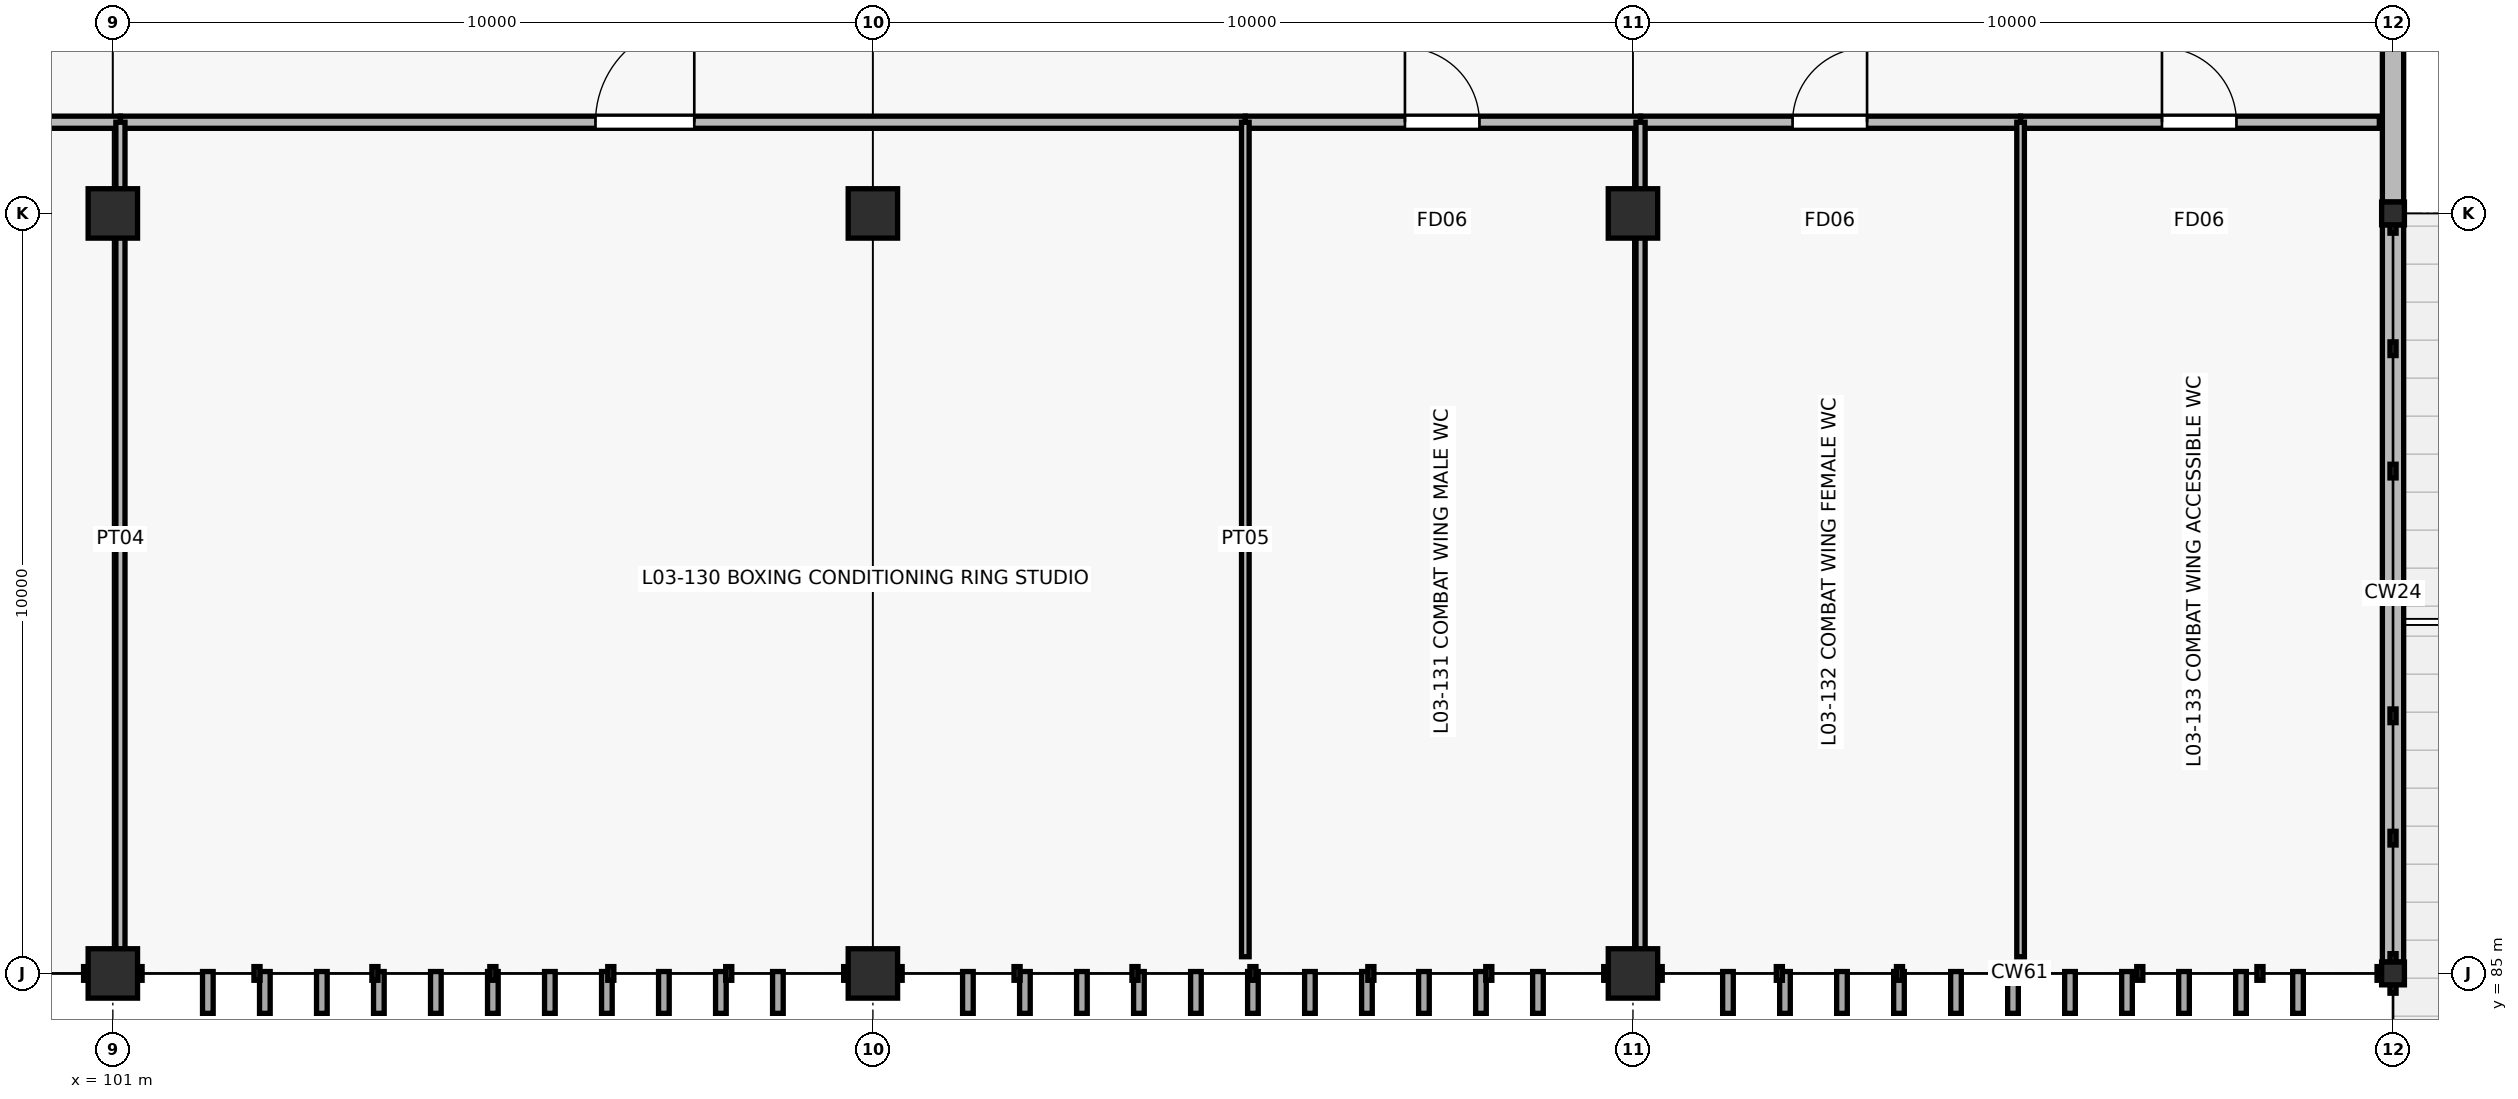
"""IFC4 building model, lengths in metres.
Left out: names, types, materials, properties, quantities, classifications, styles, units other than length and angle.
Written with IfcOpenShell. Run it as: python <this file> out.ifc"""

import sys

from ifc_helpers import new_model, si_unit, direction, frame, frame_2d, origin, origin_2d, place, context, subcontext, project, spatial, rectangle, i_section, extrude, element, fill, save


model = new_model("IFC4")
c1 = context("Model", 3, precision=1e-05, world=origin(), true_north=direction((0.0, 1.0)))
c2 = subcontext(c1, "Body", "Model", "MODEL_VIEW")
j1 = project(units=[si_unit("LENGTHUNIT", "METRE"), si_unit("PLANEANGLEUNIT", "RADIAN")], contexts=[c1])
p1 = place(None, origin())
s1 = spatial("IfcSite", under=j1, at=p1, CompositionType="ELEMENT")
p2 = place(p1, origin())
s2 = spatial("IfcBuilding", under=s1, at=p2, CompositionType="ELEMENT")
p3 = place(p2, frame((0.0, 0.0, 13.2)))
s3 = spatial("IfcBuildingStorey", under=s2, at=p3, CompositionType="ELEMENT", Elevation=13.2)
for number, where, z_axis, x_axis in (
    (1, (131.0, 85.0, 0.0), (0.0, 0.0, 1.0), (1.0, 0.0, 0.0)),
    (2, (131.0, 95.0, 0.0), (0.0, 0.0, 1.0), (1.0, 0.0, 0.0)),
):
    element("IfcColumn", number, at=place(p3, frame(where, z_axis=z_axis, x_axis=x_axis)), inside=s3, PredefinedType="COLUMN", context=c2, shape_type="SweptSolid", body=[
        extrude(i_section(OverallWidth=0.3, OverallDepth=0.3, WebThickness=0.011, FlangeThickness=0.019, at=origin_2d()), origin(), (0.0, 0.0, 1.0), 4.2),
    ])
for number, where, z_axis, x_axis in (
    (3, (101.0, 85.0, 0.0), (0.0, 0.0, 1.0), (1.0, 0.0, 0.0)),
    (4, (101.0, 95.0, 0.0), (0.0, 0.0, 1.0), (1.0, 0.0, 0.0)),
    (5, (111.0, 85.0, 0.0), (0.0, 0.0, 1.0), (1.0, 0.0, 0.0)),
    (6, (111.0, 95.0, 0.0), (0.0, 0.0, 1.0), (1.0, 0.0, 0.0)),
    (7, (121.0, 85.0, 0.0), (0.0, 0.0, 1.0), (1.0, 0.0, 0.0)),
    (8, (121.0, 95.0, 0.0), (0.0, 0.0, 1.0), (1.0, 0.0, 0.0)),
):
    element("IfcColumn", number, at=place(p3, frame(where, z_axis=z_axis, x_axis=x_axis)), inside=s3, PredefinedType="COLUMN", context=c2, shape_type="SweptSolid", body=[
        extrude(rectangle(XDim=0.65, YDim=0.65, at=origin_2d()), origin(), (0.0, 0.0, 1.0), 4.2),
    ])
p4 = place(p3, frame((131.0, 94.85, 0.0), z_axis=(0.0, 0.0, 1.0), x_axis=(0.0, -1.0, 0.0)))
e9 = element("IfcWall", 9, at=p4, inside=s3, PredefinedType="SOLIDWALL", context=c2, shape_type="SweptSolid", body=[
    extrude(rectangle(XDim=9.7, YDim=0.28, at=frame_2d((4.85, 0.0))), origin(), (0.0, 0.0, 1.0), 0.475),
])
p5 = place(p3, frame((131.0, 104.675, 0.0), z_axis=(0.0, 0.0, 1.0), x_axis=(0.0, -1.0, 0.0)))
e10 = element("IfcWall", 10, at=p5, inside=s3, PredefinedType="SOLIDWALL", context=c2, shape_type="SweptSolid", body=[
    extrude(rectangle(XDim=9.525, YDim=0.28, at=frame_2d((4.763, 0.0))), origin(), (0.0, 0.0, 1.0), 0.475),
])
p6 = place(p3, frame((79.1, 96.2, 0.0), z_axis=(0.0, 0.0, 1.0), x_axis=(1.0, 0.0, 0.0)))
e11 = element("IfcWall", 11, at=p6, inside=s3, PredefinedType="PARTITIONING", context=c2, shape_type="SweptSolid", body=[
    extrude(rectangle(XDim=22.0, YDim=0.16, at=frame_2d((11.0, 0.0))), origin(), (0.0, 0.0, 1.0), 3.005),
])
p7 = place(p6, frame((7.95, 0.0, 0.0)))
e12 = element("IfcOpeningElement", 12, at=p7, cuts=e11, PredefinedType="OPENING", context=c2, shape_type="SweptSolid", body=[
    extrude(rectangle(XDim=1.7, YDim=2.25, at=frame_2d((0.85, 1.125))), frame((0.0, 0.09, 0.0), z_axis=(0.0, -1.0, 0.0), x_axis=(1.0, 0.0, 0.0)), (0.0, 0.0, 1.0), 0.18),
])
p8 = place(p3, frame((101.1, 96.2, 0.0), z_axis=(0.0, 0.0, 1.0), x_axis=(1.0, 0.0, 0.0)))
e13 = element("IfcWall", 13, at=p8, inside=s3, PredefinedType="PARTITIONING", context=c2, shape_type="SweptSolid", body=[
    extrude(rectangle(XDim=14.8, YDim=0.16, at=frame_2d((7.4, 0.0))), origin(), (0.0, 0.0, 1.0), 3.005),
])
p9 = place(p8, frame((6.25, 0.0, 0.0)))
e14 = element("IfcOpeningElement", 14, at=p9, cuts=e13, PredefinedType="OPENING", context=c2, shape_type="SweptSolid", body=[
    extrude(rectangle(XDim=1.3, YDim=2.2, at=frame_2d((0.65, 1.1))), frame((0.0, 0.09, 0.0), z_axis=(0.0, -1.0, 0.0), x_axis=(1.0, 0.0, 0.0)), (0.0, 0.0, 1.0), 0.18),
])
p10 = place(p3, frame((101.1, 85.22, 0.0), z_axis=(0.0, 0.0, 1.0), x_axis=(0.0, 1.0, 0.0)))
e15 = element("IfcWall", 15, at=p10, inside=s3, PredefinedType="PARTITIONING", context=c2, shape_type="SweptSolid", body=[
    extrude(rectangle(XDim=10.98, YDim=0.12, at=frame_2d((5.49, 0.0))), origin(), (0.0, 0.0, 1.0), 3.005),
])
p11 = place(p3, frame((115.9, 96.2, 0.0), z_axis=(0.0, 0.0, 1.0), x_axis=(1.0, 0.0, 0.0)))
e16 = element("IfcWall", 16, at=p11, inside=s3, PredefinedType="PARTITIONING", context=c2, shape_type="SweptSolid", body=[
    extrude(rectangle(XDim=5.2, YDim=0.16, at=frame_2d((2.6, 0.0))), origin(), (0.0, 0.0, 1.0), 3.005),
])
p12 = place(p11, frame((2.1, 0.0, 0.0)))
e17 = element("IfcOpeningElement", 17, at=p12, cuts=e16, PredefinedType="OPENING", context=c2, shape_type="SweptSolid", body=[
    extrude(rectangle(XDim=0.98, YDim=2.1, at=frame_2d((0.49, 1.05))), frame((0.0, 0.09, 0.0), z_axis=(0.0, -1.0, 0.0), x_axis=(1.0, 0.0, 0.0)), (0.0, 0.0, 1.0), 0.18),
])
p13 = place(p3, frame((115.9, 85.22, 0.0), z_axis=(0.0, 0.0, 1.0), x_axis=(0.0, 1.0, 0.0)))
e18 = element("IfcWall", 18, at=p13, inside=s3, PredefinedType="PARTITIONING", context=c2, shape_type="SweptSolid", body=[
    extrude(rectangle(XDim=10.98, YDim=0.1, at=frame_2d((5.49, 0.0))), origin(), (0.0, 0.0, 1.0), 3.005),
])
p14 = place(p3, frame((121.1, 96.2, 0.0), z_axis=(0.0, 0.0, 1.0), x_axis=(1.0, 0.0, 0.0)))
e19 = element("IfcWall", 19, at=p14, inside=s3, PredefinedType="PARTITIONING", context=c2, shape_type="SweptSolid", body=[
    extrude(rectangle(XDim=5.0, YDim=0.16, at=frame_2d((2.5, 0.0))), origin(), (0.0, 0.0, 1.0), 3.005),
])
p15 = place(p14, frame((2.0, 0.0, 0.0)))
e20 = element("IfcOpeningElement", 20, at=p15, cuts=e19, PredefinedType="OPENING", context=c2, shape_type="SweptSolid", body=[
    extrude(rectangle(XDim=0.98, YDim=2.1, at=frame_2d((0.49, 1.05))), frame((0.0, 0.09, 0.0), z_axis=(0.0, -1.0, 0.0), x_axis=(1.0, 0.0, 0.0)), (0.0, 0.0, 1.0), 0.18),
])
p16 = place(p3, frame((121.1, 85.22, 0.0), z_axis=(0.0, 0.0, 1.0), x_axis=(0.0, 1.0, 0.0)))
e21 = element("IfcWall", 21, at=p16, inside=s3, PredefinedType="PARTITIONING", context=c2, shape_type="SweptSolid", body=[
    extrude(rectangle(XDim=10.98, YDim=0.12, at=frame_2d((5.49, 0.0))), origin(), (0.0, 0.0, 1.0), 3.005),
])
p17 = place(p3, frame((126.1, 96.2, 0.0), z_axis=(0.0, 0.0, 1.0), x_axis=(1.0, 0.0, 0.0)))
e22 = element("IfcWall", 22, at=p17, inside=s3, PredefinedType="PARTITIONING", context=c2, shape_type="SweptSolid", body=[
    extrude(rectangle(XDim=4.72, YDim=0.16, at=frame_2d((2.36, 0.0))), origin(), (0.0, 0.0, 1.0), 3.005),
])
p18 = place(p17, frame((1.86, 0.0, 0.0)))
e23 = element("IfcOpeningElement", 23, at=p18, cuts=e22, PredefinedType="OPENING", context=c2, shape_type="SweptSolid", body=[
    extrude(rectangle(XDim=0.98, YDim=2.1, at=frame_2d((0.49, 1.05))), frame((0.0, 0.09, 0.0), z_axis=(0.0, -1.0, 0.0), x_axis=(1.0, 0.0, 0.0)), (0.0, 0.0, 1.0), 0.18),
])
p19 = place(p3, frame((126.1, 85.22, 0.0), z_axis=(0.0, 0.0, 1.0), x_axis=(0.0, 1.0, 0.0)))
e24 = element("IfcWall", 24, at=p19, inside=s3, PredefinedType="PARTITIONING", context=c2, shape_type="SweptSolid", body=[
    extrude(rectangle(XDim=10.98, YDim=0.1, at=frame_2d((5.49, 0.0))), origin(), (0.0, 0.0, 1.0), 3.005),
])
p20 = place(p9, origin())
e25 = element("IfcDoor", 25, at=p20, inside=s3, OperationType="SINGLE_SWING_RIGHT", PredefinedType="DOOR", context=c2, shape_type="SweptSolid", body=[
    extrude(rectangle(XDim=1.3, YDim=2.2, at=frame_2d((0.65, 1.1))), frame((0.0, 0.025, 0.0), z_axis=(0.0, -1.0, 0.0), x_axis=(1.0, 0.0, 0.0)), (0.0, 0.0, 1.0), 0.05),
])
fill(e14, e25)
p21 = place(p12, origin())
e26 = element("IfcDoor", 26, at=p21, inside=s3, OperationType="SINGLE_SWING_LEFT", PredefinedType="DOOR", context=c2, shape_type="SweptSolid", body=[
    extrude(rectangle(XDim=0.98, YDim=2.1, at=frame_2d((0.49, 1.05))), frame((0.0, 0.025, 0.0), z_axis=(0.0, -1.0, 0.0), x_axis=(1.0, 0.0, 0.0)), (0.0, 0.0, 1.0), 0.05),
])
fill(e17, e26)
p22 = place(p15, origin())
e27 = element("IfcDoor", 27, at=p22, inside=s3, OperationType="SINGLE_SWING_RIGHT", PredefinedType="DOOR", context=c2, shape_type="SweptSolid", body=[
    extrude(rectangle(XDim=0.98, YDim=2.1, at=frame_2d((0.49, 1.05))), frame((0.0, 0.025, 0.0), z_axis=(0.0, -1.0, 0.0), x_axis=(1.0, 0.0, 0.0)), (0.0, 0.0, 1.0), 0.05),
])
fill(e20, e27)
p23 = place(p18, origin())
e28 = element("IfcDoor", 28, at=p23, inside=s3, OperationType="SINGLE_SWING_LEFT", PredefinedType="DOOR", context=c2, shape_type="SweptSolid", body=[
    extrude(rectangle(XDim=0.98, YDim=2.1, at=frame_2d((0.49, 1.05))), frame((0.0, 0.025, 0.0), z_axis=(0.0, -1.0, 0.0), x_axis=(1.0, 0.0, 0.0)), (0.0, 0.0, 1.0), 0.05),
])
fill(e23, e28)
save(model, sys.argv[1])
